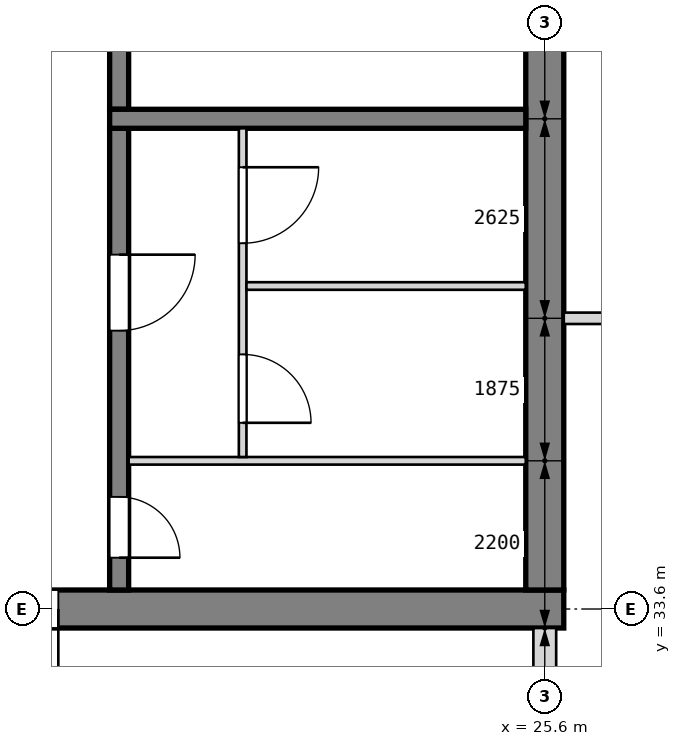
"""IFC4 building model, lengths in metres.
Left out: names, types, materials, properties, quantities, classifications, styles, units other than length and angle.
Written with IfcOpenShell. Run it as: python <this file> out.ifc"""

import sys

from ifc_helpers import new_model, si_unit, direction, frame, frame_2d, origin, place, context, subcontext, project, spatial, rectangle, extrude, element, fill, save


model = new_model("IFC4")
c1 = context("Model", 3, precision=1e-05, world=origin(), true_north=direction((0.0, 1.0)))
c2 = subcontext(c1, "Body", "Model", "MODEL_VIEW")
j1 = project(units=[si_unit("LENGTHUNIT", "METRE"), si_unit("PLANEANGLEUNIT", "RADIAN")], contexts=[c1])
p1 = place(None, origin())
s1 = spatial("IfcSite", under=j1, at=p1, CompositionType="ELEMENT")
p2 = place(p1, origin())
s2 = spatial("IfcBuilding", under=s1, at=p2, CompositionType="ELEMENT")
p3 = place(p2, frame((0.0, 0.0, 8.4)))
s3 = spatial("IfcBuildingStorey", under=s2, at=p3, CompositionType="ELEMENT", Elevation=8.4)
p4 = place(p3, frame((12.55, 33.6, 0.0), z_axis=(0.0, 0.0, 1.0), x_axis=(1.0, 0.0, 0.0)))
e1 = element("IfcWall", 1, at=p4, inside=s3, PredefinedType="SHEAR", context=c2, shape_type="SweptSolid", body=[
    extrude(rectangle(XDim=13.3, YDim=0.5, at=frame_2d((6.65, 0.0))), origin(), (0.0, 0.0, 1.0), 4.5),
])
p5 = place(p4, frame((1.85, 0.0, 1.0)))
e2 = element("IfcOpeningElement", 2, at=p5, cuts=e1, PredefinedType="OPENING", context=c2, shape_type="SweptSolid", body=[
    extrude(rectangle(XDim=0.4, YDim=2.0, at=frame_2d((0.2, 1.0))), frame((0.0, 0.26, 0.0), z_axis=(0.0, -1.0, 0.0), x_axis=(1.0, 0.0, 0.0)), (0.0, 0.0, 1.0), 0.52),
])
p6 = place(p4, frame((4.65, 0.0, 0.0)))
e3 = element("IfcOpeningElement", 3, at=p6, cuts=e1, PredefinedType="OPENING", context=c2, shape_type="SweptSolid", body=[
    extrude(rectangle(XDim=2.0, YDim=2.1, at=frame_2d((1.0, 1.05))), frame((0.0, 0.26, 0.0), z_axis=(0.0, -1.0, 0.0), x_axis=(1.0, 0.0, 0.0)), (0.0, 0.0, 1.0), 0.52),
])
p7 = place(p3, frame((25.6, 33.85, 0.0), z_axis=(0.0, 0.0, 1.0), x_axis=(0.0, 1.0, 0.0)))
e4 = element("IfcWall", 4, at=p7, inside=s3, PredefinedType="SHEAR", context=c2, shape_type="SweptSolid", body=[
    extrude(rectangle(XDim=18.7, YDim=0.5, at=frame_2d((9.35, 0.0))), origin(), (0.0, 0.0, 1.0), 4.5),
])
p8 = place(p7, frame((8.35, 0.0, 0.0)))
e5 = element("IfcOpeningElement", 5, at=p8, cuts=e4, PredefinedType="OPENING", context=c2, shape_type="SweptSolid", body=[
    extrude(rectangle(XDim=2.0, YDim=2.1, at=frame_2d((1.0, 1.05))), frame((0.0, 0.26, 0.0), z_axis=(0.0, -1.0, 0.0), x_axis=(1.0, 0.0, 0.0)), (0.0, 0.0, 1.0), 0.52),
])
p9 = place(p3, frame((25.6, 31.0, 0.0), z_axis=(0.0, 0.0, 1.0), x_axis=(0.0, 1.0, 0.0)))
e6 = element("IfcWall", 6, at=p9, inside=s3, PredefinedType="SOLIDWALL", context=c2, shape_type="SweptSolid", body=[
    extrude(rectangle(XDim=2.35, YDim=0.3, at=frame_2d((1.175, 0.0))), origin(), (0.0, 0.0, 1.0), 3.48),
])
p10 = place(p3, frame((20.0, 33.85, 0.0), z_axis=(0.0, 0.0, 1.0), x_axis=(0.0, 1.0, 0.0)))
e7 = element("IfcWall", 7, at=p10, inside=s3, PredefinedType="SOLIDWALL", context=c2, shape_type="SweptSolid", body=[
    extrude(rectangle(XDim=6.075, YDim=0.25, at=frame_2d((3.038, 0.0))), origin(), (0.0, 0.0, 1.0), 4.2),
])
p11 = place(p10, frame((0.425, 0.0, 0.0)))
e8 = element("IfcOpeningElement", 8, at=p11, cuts=e7, PredefinedType="OPENING", context=c2, shape_type="SweptSolid", body=[
    extrude(rectangle(XDim=0.8, YDim=2.1, at=frame_2d((0.4, 1.05))), frame((0.0, 0.135, 0.0), z_axis=(0.0, -1.0, 0.0), x_axis=(1.0, 0.0, 0.0)), (0.0, 0.0, 1.0), 0.27),
])
p12 = place(p10, frame((3.413, 0.0, 0.0)))
e9 = element("IfcOpeningElement", 9, at=p12, cuts=e7, PredefinedType="OPENING", context=c2, shape_type="SweptSolid", body=[
    extrude(rectangle(XDim=1.0, YDim=2.1, at=frame_2d((0.5, 1.05))), frame((0.0, 0.135, 0.0), z_axis=(0.0, -1.0, 0.0), x_axis=(1.0, 0.0, 0.0)), (0.0, 0.0, 1.0), 0.27),
])
p13 = place(p3, frame((20.0, 40.175, 0.0), z_axis=(0.0, 0.0, 1.0), x_axis=(0.0, 1.0, 0.0)))
e10 = element("IfcWall", 10, at=p13, inside=s3, PredefinedType="SOLIDWALL", context=c2, shape_type="SweptSolid", body=[
    extrude(rectangle(XDim=6.05, YDim=0.25, at=frame_2d((3.025, 0.0))), origin(), (0.0, 0.0, 1.0), 4.2),
])
p14 = place(p13, frame((2.025, 0.0, 0.0)))
e11 = element("IfcOpeningElement", 11, at=p14, cuts=e10, PredefinedType="OPENING", context=c2, shape_type="SweptSolid", body=[
    extrude(rectangle(XDim=2.0, YDim=2.1, at=frame_2d((1.0, 1.05))), frame((0.0, 0.135, 0.0), z_axis=(0.0, -1.0, 0.0), x_axis=(1.0, 0.0, 0.0)), (0.0, 0.0, 1.0), 0.27),
])
p15 = place(p3, frame((19.875, 40.05, 0.0), z_axis=(0.0, 0.0, 1.0), x_axis=(1.0, 0.0, 0.0)))
e12 = element("IfcWall", 12, at=p15, inside=s3, PredefinedType="SOLIDWALL", context=c2, shape_type="SweptSolid", body=[
    extrude(rectangle(XDim=5.475, YDim=0.25, at=frame_2d((2.738, 0.0))), origin(), (0.0, 0.0, 1.0), 4.2),
])
p16 = place(p3, frame((20.125, 35.55, 0.0), z_axis=(0.0, 0.0, 1.0), x_axis=(1.0, 0.0, 0.0)))
e13 = element("IfcWall", 13, at=p16, inside=s3, PredefinedType="PARTITIONING", context=c2, shape_type="SweptSolid", body=[
    extrude(rectangle(XDim=5.225, YDim=0.1, at=frame_2d((2.613, 0.0))), origin(), (0.0, 0.0, 1.0), 4.2),
])
p17 = place(p3, frame((21.625, 35.6, 0.0), z_axis=(0.0, 0.0, 1.0), x_axis=(0.0, 1.0, 0.0)))
e14 = element("IfcWall", 14, at=p17, inside=s3, PredefinedType="PARTITIONING", context=c2, shape_type="SweptSolid", body=[
    extrude(rectangle(XDim=4.325, YDim=0.1, at=frame_2d((2.163, 0.0))), origin(), (0.0, 0.0, 1.0), 4.2),
])
p18 = place(p17, frame((0.45, 0.0, 0.0)))
e15 = element("IfcOpeningElement", 15, at=p18, cuts=e14, PredefinedType="OPENING", context=c2, shape_type="SweptSolid", body=[
    extrude(rectangle(XDim=0.9, YDim=2.1, at=frame_2d((0.45, 1.05))), frame((0.0, 0.06, 0.0), z_axis=(0.0, -1.0, 0.0), x_axis=(1.0, 0.0, 0.0)), (0.0, 0.0, 1.0), 0.12),
])
p19 = place(p17, frame((2.812, 0.0, 0.0)))
e16 = element("IfcOpeningElement", 16, at=p19, cuts=e14, PredefinedType="OPENING", context=c2, shape_type="SweptSolid", body=[
    extrude(rectangle(XDim=1.0, YDim=2.1, at=frame_2d((0.5, 1.05))), frame((0.0, 0.06, 0.0), z_axis=(0.0, -1.0, 0.0), x_axis=(1.0, 0.0, 0.0)), (0.0, 0.0, 1.0), 0.12),
])
p20 = place(p3, frame((21.675, 37.85, 0.0), z_axis=(0.0, 0.0, 1.0), x_axis=(1.0, 0.0, 0.0)))
e17 = element("IfcWall", 17, at=p20, inside=s3, PredefinedType="PARTITIONING", context=c2, shape_type="SweptSolid", body=[
    extrude(rectangle(XDim=3.675, YDim=0.1, at=frame_2d((1.837, 0.0))), origin(), (0.0, 0.0, 1.0), 4.2),
])
p21 = place(p3, frame((25.85, 37.425, 0.0), z_axis=(0.0, 0.0, 1.0), x_axis=(1.0, 0.0, 0.0)))
e18 = element("IfcWall", 18, at=p21, inside=s3, PredefinedType="PARTITIONING", context=c2, shape_type="SweptSolid", body=[
    extrude(rectangle(XDim=5.97, YDim=0.15, at=frame_2d((2.985, 0.0))), origin(), (0.0, 0.0, 1.0), 4.28),
])
p22 = place(p21, frame((2.45, 0.0, 0.0)))
e19 = element("IfcOpeningElement", 19, at=p22, cuts=e18, PredefinedType="OPENING", context=c2, shape_type="SweptSolid", body=[
    extrude(rectangle(XDim=1.0, YDim=2.1, at=frame_2d((0.5, 1.05))), frame((0.0, 0.085, 0.0), z_axis=(0.0, -1.0, 0.0), x_axis=(1.0, 0.0, 0.0)), (0.0, 0.0, 1.0), 0.17),
])
p23 = place(p11, frame((0.8, 0.0, 0.0), z_axis=(0.0, 0.0, 1.0), x_axis=(-1.0, 0.0, 0.0)))
e20 = element("IfcDoor", 20, at=p23, inside=s3, OperationType="SINGLE_SWING_RIGHT", PredefinedType="DOOR", context=c2, shape_type="SweptSolid", body=[
    extrude(rectangle(XDim=0.8, YDim=2.1, at=frame_2d((0.4, 1.05))), frame((0.0, 0.025, 0.0), z_axis=(0.0, -1.0, 0.0), x_axis=(1.0, 0.0, 0.0)), (0.0, 0.0, 1.0), 0.05),
])
fill(e8, e20)
p24 = place(p12, frame((1.0, 0.0, 0.0), z_axis=(0.0, 0.0, 1.0), x_axis=(-1.0, 0.0, 0.0)))
e21 = element("IfcDoor", 21, at=p24, inside=s3, OperationType="SINGLE_SWING_LEFT", PredefinedType="DOOR", context=c2, shape_type="SweptSolid", body=[
    extrude(rectangle(XDim=1.0, YDim=2.1, at=frame_2d((0.5, 1.05))), frame((0.0, 0.025, 0.0), z_axis=(0.0, -1.0, 0.0), x_axis=(1.0, 0.0, 0.0)), (0.0, 0.0, 1.0), 0.05),
])
fill(e9, e21)
p25 = place(p18, frame((0.9, 0.0, 0.0), z_axis=(0.0, 0.0, 1.0), x_axis=(-1.0, 0.0, 0.0)))
e22 = element("IfcDoor", 22, at=p25, inside=s3, OperationType="SINGLE_SWING_RIGHT", PredefinedType="DOOR", context=c2, shape_type="SweptSolid", body=[
    extrude(rectangle(XDim=0.9, YDim=2.1, at=frame_2d((0.45, 1.05))), frame((0.0, 0.025, 0.0), z_axis=(0.0, -1.0, 0.0), x_axis=(1.0, 0.0, 0.0)), (0.0, 0.0, 1.0), 0.05),
])
fill(e15, e22)
p26 = place(p19, frame((1.0, 0.0, 0.0), z_axis=(0.0, 0.0, 1.0), x_axis=(-1.0, 0.0, 0.0)))
e23 = element("IfcDoor", 23, at=p26, inside=s3, OperationType="SINGLE_SWING_LEFT", PredefinedType="DOOR", context=c2, shape_type="SweptSolid", body=[
    extrude(rectangle(XDim=1.0, YDim=2.1, at=frame_2d((0.5, 1.05))), frame((0.0, 0.025, 0.0), z_axis=(0.0, -1.0, 0.0), x_axis=(1.0, 0.0, 0.0)), (0.0, 0.0, 1.0), 0.05),
])
fill(e16, e23)
p27 = place(p6, frame((2.0, 0.0, 0.0), z_axis=(0.0, 0.0, 1.0), x_axis=(-1.0, 0.0, 0.0)))
e24 = element("IfcDoor", 24, at=p27, inside=s3, OperationType="DOUBLE_DOOR_SINGLE_SWING", PredefinedType="DOOR", context=c2, shape_type="SweptSolid", body=[
    extrude(rectangle(XDim=2.0, YDim=2.1, at=frame_2d((1.0, 1.05))), frame((0.0, 0.025, 0.0), z_axis=(0.0, -1.0, 0.0), x_axis=(1.0, 0.0, 0.0)), (0.0, 0.0, 1.0), 0.05),
])
fill(e3, e24)
save(model, sys.argv[1])
